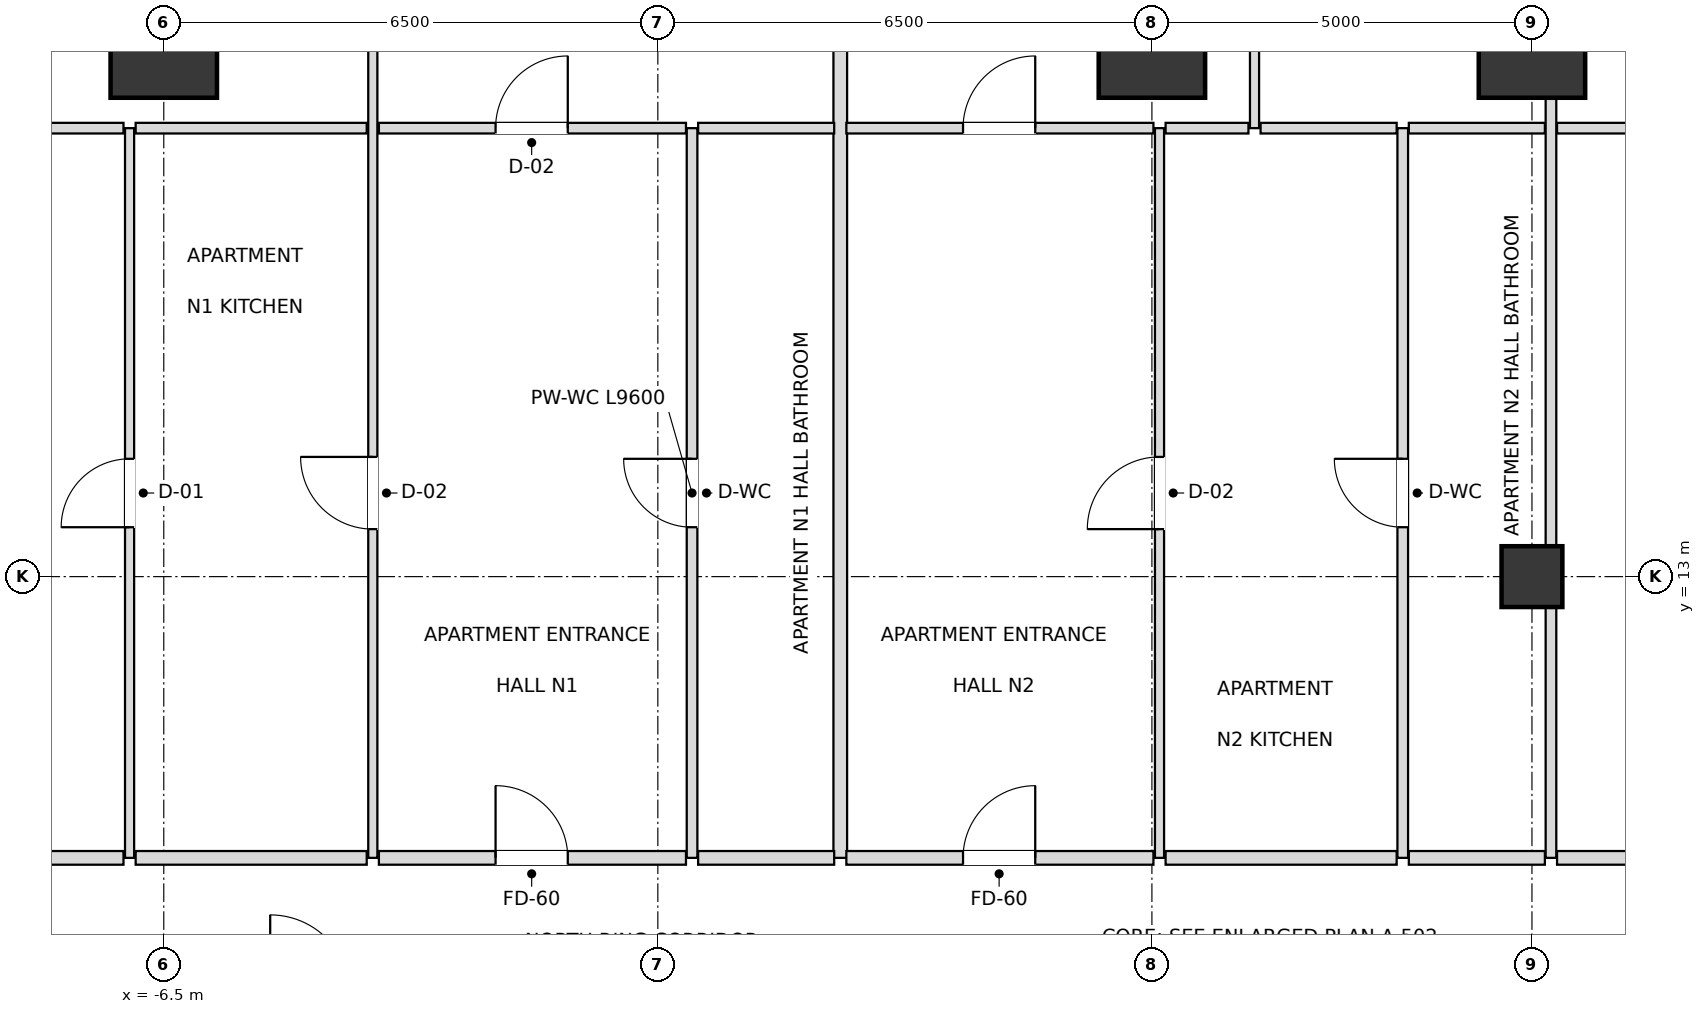
"""IFC4 building model, lengths in metres.
Left out: names, types, materials, properties, quantities, classifications, styles, units other than length and angle.
Written with IfcOpenShell. Run it as: python <this file> out.ifc"""

import sys

from ifc_helpers import new_model, si_unit, direction, frame, frame_2d, origin, origin_2d, place, context, subcontext, project, spatial, rectangle, extrude, element, fill, save


model = new_model("IFC4")
c1 = context("Model", 3, precision=1e-05, world=origin(), true_north=direction((0.0, 1.0)))
c2 = subcontext(c1, "Body", "Model", "MODEL_VIEW")
j1 = project(units=[si_unit("LENGTHUNIT", "METRE"), si_unit("PLANEANGLEUNIT", "RADIAN")], contexts=[c1])
p1 = place(None, origin())
s1 = spatial("IfcSite", under=j1, at=p1, CompositionType="ELEMENT")
p2 = place(p1, origin())
s2 = spatial("IfcBuilding", under=s1, at=p2, CompositionType="ELEMENT")
p3 = place(p2, frame((0.0, 0.0, 64.8)))
s3 = spatial("IfcBuildingStorey", under=s2, at=p3, CompositionType="ELEMENT", Elevation=64.8)
for number, where, z_axis, x_axis in (
    (1, (11.5, 20.0, 0.0), (0.0, 0.0, 1.0), (1.0, 0.0, 0.0)),
    (2, (6.5, 20.0, 0.0), (0.0, 0.0, 1.0), (1.0, 0.0, 0.0)),
    (3, (-6.5, 20.0, 0.0), (0.0, 0.0, 1.0), (1.0, 0.0, 0.0)),
):
    element("IfcColumn", number, at=place(p3, frame(where, z_axis=z_axis, x_axis=x_axis)), inside=s3, PredefinedType="USERDEFINED", context=c2, shape_type="SweptSolid", body=[
        extrude(rectangle(XDim=1.4, YDim=1.4, at=origin_2d()), origin(), (0.0, 0.0, 1.0), 3.6),
    ])
p4 = place(p3, frame((11.5, 13.0, 0.0), z_axis=(0.0, 0.0, 1.0), x_axis=(1.0, 0.0, 0.0)))
e4 = element("IfcColumn", 4, at=p4, inside=s3, PredefinedType="COLUMN", context=c2, shape_type="SweptSolid", body=[
    extrude(rectangle(XDim=0.8, YDim=0.8, at=origin_2d()), origin(), (0.0, 0.0, 1.0), 3.6),
])
p5 = place(p3, frame((-6.95, 9.3, 0.0), z_axis=(0.0, 0.0, 1.0), x_axis=(0.0, 1.0, 0.0)))
e5 = element("IfcWall", 5, at=p5, inside=s3, PredefinedType="PARTITIONING", context=c2, shape_type="SweptSolid", body=[
    extrude(rectangle(XDim=9.6, YDim=0.12, at=frame_2d((4.8, 0.0))), origin(), (0.0, 0.0, 1.0), 2.816),
])
p6 = place(p5, frame((4.35, 0.0, 0.0)))
e6 = element("IfcOpeningElement", 6, at=p6, cuts=e5, PredefinedType="OPENING", context=c2, shape_type="SweptSolid", body=[
    extrude(rectangle(XDim=0.9, YDim=2.1, at=frame_2d((0.45, 1.05))), frame((0.0, 0.07, 0.0), z_axis=(0.0, -1.0, 0.0), x_axis=(1.0, 0.0, 0.0)), (0.0, 0.0, 1.0), 0.14),
])
p7 = place(p3, frame((-3.75, 9.3, 0.0), z_axis=(0.0, 0.0, 1.0), x_axis=(0.0, 1.0, 0.0)))
e7 = element("IfcWall", 7, at=p7, inside=s3, PredefinedType="PARTITIONING", context=c2, shape_type="SweptSolid", body=[
    extrude(rectangle(XDim=15.6, YDim=0.12, at=frame_2d((7.8, 0.0))), origin(), (0.0, 0.0, 1.0), 2.816),
])
p8 = place(p7, frame((4.325, 0.0, 0.0)))
e8 = element("IfcOpeningElement", 8, at=p8, cuts=e7, PredefinedType="OPENING", context=c2, shape_type="SweptSolid", body=[
    extrude(rectangle(XDim=0.95, YDim=2.1, at=frame_2d((0.475, 1.05))), frame((0.0, 0.07, 0.0), z_axis=(0.0, -1.0, 0.0), x_axis=(1.0, 0.0, 0.0)), (0.0, 0.0, 1.0), 0.14),
])
p9 = place(p7, frame((12.15, 0.0, 0.0)))
e9 = element("IfcOpeningElement", 9, at=p9, cuts=e7, PredefinedType="OPENING", context=c2, shape_type="SweptSolid", body=[
    extrude(rectangle(XDim=0.9, YDim=2.1, at=frame_2d((0.45, 1.05))), frame((0.0, 0.07, 0.0), z_axis=(0.0, -1.0, 0.0), x_axis=(1.0, 0.0, 0.0)), (0.0, 0.0, 1.0), 0.14),
])
p10 = place(p3, frame((0.45, 9.3, 0.0), z_axis=(0.0, 0.0, 1.0), x_axis=(0.0, 1.0, 0.0)))
e10 = element("IfcWall", 10, at=p10, inside=s3, PredefinedType="PARTITIONING", context=c2, shape_type="SweptSolid", body=[
    extrude(rectangle(XDim=9.6, YDim=0.14, at=frame_2d((4.8, 0.0))), origin(), (0.0, 0.0, 1.0), 2.948),
])
p11 = place(p10, frame((4.35, 0.0, 0.0)))
e11 = element("IfcOpeningElement", 11, at=p11, cuts=e10, PredefinedType="OPENING", context=c2, shape_type="SweptSolid", body=[
    extrude(rectangle(XDim=0.9, YDim=2.1, at=frame_2d((0.45, 1.05))), frame((0.0, 0.08, 0.0), z_axis=(0.0, -1.0, 0.0), x_axis=(1.0, 0.0, 0.0)), (0.0, 0.0, 1.0), 0.16),
])
p12 = place(p3, frame((2.4, 9.3, 0.0), z_axis=(0.0, 0.0, 1.0), x_axis=(0.0, 1.0, 0.0)))
e12 = element("IfcWall", 12, at=p12, inside=s3, PredefinedType="PARTITIONING", context=c2, shape_type="SweptSolid", body=[
    extrude(rectangle(XDim=15.6, YDim=0.18, at=frame_2d((7.8, 0.0))), origin(), (0.0, 0.0, 1.0), 2.816),
])
p13 = place(p3, frame((6.6, 9.3, 0.0), z_axis=(0.0, 0.0, 1.0), x_axis=(0.0, 1.0, 0.0)))
e13 = element("IfcWall", 13, at=p13, inside=s3, PredefinedType="PARTITIONING", context=c2, shape_type="SweptSolid", body=[
    extrude(rectangle(XDim=9.6, YDim=0.12, at=frame_2d((4.8, 0.0))), origin(), (0.0, 0.0, 1.0), 2.816),
])
p14 = place(p13, frame((4.325, 0.0, 0.0)))
e14 = element("IfcOpeningElement", 14, at=p14, cuts=e13, PredefinedType="OPENING", context=c2, shape_type="SweptSolid", body=[
    extrude(rectangle(XDim=0.95, YDim=2.1, at=frame_2d((0.475, 1.05))), frame((0.0, 0.07, 0.0), z_axis=(0.0, -1.0, 0.0), x_axis=(1.0, 0.0, 0.0)), (0.0, 0.0, 1.0), 0.14),
])
p15 = place(p3, frame((7.85, 18.9, 0.0), z_axis=(0.0, 0.0, 1.0), x_axis=(0.0, 1.0, 0.0)))
e15 = element("IfcWall", 15, at=p15, inside=s3, PredefinedType="PARTITIONING", context=c2, shape_type="SweptSolid", body=[
    extrude(rectangle(XDim=6.0, YDim=0.12, at=frame_2d((3.0, 0.0))), origin(), (0.0, 0.0, 1.0), 2.816),
])
p16 = place(p15, frame((2.55, 0.0, 0.0)))
e16 = element("IfcOpeningElement", 16, at=p16, cuts=e15, PredefinedType="OPENING", context=c2, shape_type="SweptSolid", body=[
    extrude(rectangle(XDim=0.9, YDim=2.1, at=frame_2d((0.45, 1.05))), frame((0.0, 0.07, 0.0), z_axis=(0.0, -1.0, 0.0), x_axis=(1.0, 0.0, 0.0)), (0.0, 0.0, 1.0), 0.14),
])
p17 = place(p3, frame((9.8, 9.3, 0.0), z_axis=(0.0, 0.0, 1.0), x_axis=(0.0, 1.0, 0.0)))
e17 = element("IfcWall", 17, at=p17, inside=s3, PredefinedType="PARTITIONING", context=c2, shape_type="SweptSolid", body=[
    extrude(rectangle(XDim=9.6, YDim=0.14, at=frame_2d((4.8, 0.0))), origin(), (0.0, 0.0, 1.0), 2.816),
])
p18 = place(p17, frame((4.35, 0.0, 0.0)))
e18 = element("IfcOpeningElement", 18, at=p18, cuts=e17, PredefinedType="OPENING", context=c2, shape_type="SweptSolid", body=[
    extrude(rectangle(XDim=0.9, YDim=2.1, at=frame_2d((0.45, 1.05))), frame((0.0, 0.08, 0.0), z_axis=(0.0, -1.0, 0.0), x_axis=(1.0, 0.0, 0.0)), (0.0, 0.0, 1.0), 0.16),
])
p19 = place(p3, frame((11.75, 9.3, 0.0), z_axis=(0.0, 0.0, 1.0), x_axis=(0.0, 1.0, 0.0)))
e19 = element("IfcWall", 19, at=p19, inside=s3, PredefinedType="PARTITIONING", context=c2, shape_type="SweptSolid", body=[
    extrude(rectangle(XDim=15.6, YDim=0.14, at=frame_2d((7.8, 0.0))), origin(), (0.0, 0.0, 1.0), 2.736),
])
p20 = place(p19, frame((12.15, 0.0, 0.0)))
e20 = element("IfcOpeningElement", 20, at=p20, cuts=e19, PredefinedType="OPENING", context=c2, shape_type="SweptSolid", body=[
    extrude(rectangle(XDim=0.9, YDim=2.1, at=frame_2d((0.45, 1.05))), frame((0.0, 0.08, 0.0), z_axis=(0.0, -1.0, 0.0), x_axis=(1.0, 0.0, 0.0)), (0.0, 0.0, 1.0), 0.16),
])
p21 = place(p3, frame((-18.32, 9.3, 0.0), z_axis=(0.0, 0.0, 1.0), x_axis=(1.0, 0.0, 0.0)))
e21 = element("IfcWall", 21, at=p21, inside=s3, PredefinedType="PARTITIONING", context=c2, shape_type="SweptSolid", body=[
    extrude(rectangle(XDim=11.29, YDim=0.18, at=frame_2d((5.645, 0.0))), origin(), (0.0, 0.0, 1.0), 2.816),
])
p22 = place(p3, frame((-6.87, 9.3, 0.0), z_axis=(0.0, 0.0, 1.0), x_axis=(1.0, 0.0, 0.0)))
e22 = element("IfcWall", 22, at=p22, inside=s3, PredefinedType="PARTITIONING", context=c2, shape_type="SweptSolid", body=[
    extrude(rectangle(XDim=3.04, YDim=0.18, at=frame_2d((1.52, 0.0))), origin(), (0.0, 0.0, 1.0), 2.816),
])
p23 = place(p3, frame((-3.67, 9.3, 0.0), z_axis=(0.0, 0.0, 1.0), x_axis=(1.0, 0.0, 0.0)))
e23 = element("IfcWall", 23, at=p23, inside=s3, PredefinedType="PARTITIONING", context=c2, shape_type="SweptSolid", body=[
    extrude(rectangle(XDim=4.04, YDim=0.18, at=frame_2d((2.02, 0.0))), origin(), (0.0, 0.0, 1.0), 3.38),
])
p24 = place(p23, frame((1.535, 0.0, 0.0)))
e24 = element("IfcOpeningElement", 24, at=p24, cuts=e23, PredefinedType="OPENING", context=c2, shape_type="SweptSolid", body=[
    extrude(rectangle(XDim=0.95, YDim=2.15, at=frame_2d((0.475, 1.075))), frame((0.0, 0.1, 0.0), z_axis=(0.0, -1.0, 0.0), x_axis=(1.0, 0.0, 0.0)), (0.0, 0.0, 1.0), 0.2),
])
p25 = place(p3, frame((0.53, 9.3, 0.0), z_axis=(0.0, 0.0, 1.0), x_axis=(1.0, 0.0, 0.0)))
e25 = element("IfcWall", 25, at=p25, inside=s3, PredefinedType="PARTITIONING", context=c2, shape_type="SweptSolid", body=[
    extrude(rectangle(XDim=1.79, YDim=0.18, at=frame_2d((0.895, 0.0))), origin(), (0.0, 0.0, 1.0), 3.38),
])
p26 = place(p3, frame((2.48, 9.3, 0.0), z_axis=(0.0, 0.0, 1.0), x_axis=(1.0, 0.0, 0.0)))
e26 = element("IfcWall", 26, at=p26, inside=s3, PredefinedType="PARTITIONING", context=c2, shape_type="SweptSolid", body=[
    extrude(rectangle(XDim=4.04, YDim=0.18, at=frame_2d((2.02, 0.0))), origin(), (0.0, 0.0, 1.0), 3.38),
])
p27 = place(p26, frame((1.535, 0.0, 0.0)))
e27 = element("IfcOpeningElement", 27, at=p27, cuts=e26, PredefinedType="OPENING", context=c2, shape_type="SweptSolid", body=[
    extrude(rectangle(XDim=0.95, YDim=2.15, at=frame_2d((0.475, 1.075))), frame((0.0, 0.1, 0.0), z_axis=(0.0, -1.0, 0.0), x_axis=(1.0, 0.0, 0.0)), (0.0, 0.0, 1.0), 0.2),
])
p28 = place(p3, frame((6.68, 9.3, 0.0), z_axis=(0.0, 0.0, 1.0), x_axis=(1.0, 0.0, 0.0)))
e28 = element("IfcWall", 28, at=p28, inside=s3, PredefinedType="PARTITIONING", context=c2, shape_type="SweptSolid", body=[
    extrude(rectangle(XDim=3.04, YDim=0.18, at=frame_2d((1.52, 0.0))), origin(), (0.0, 0.0, 1.0), 3.38),
])
p29 = place(p3, frame((9.88, 9.3, 0.0), z_axis=(0.0, 0.0, 1.0), x_axis=(1.0, 0.0, 0.0)))
e29 = element("IfcWall", 29, at=p29, inside=s3, PredefinedType="PARTITIONING", context=c2, shape_type="SweptSolid", body=[
    extrude(rectangle(XDim=1.79, YDim=0.18, at=frame_2d((0.895, 0.0))), origin(), (0.0, 0.0, 1.0), 3.38),
])
p30 = place(p3, frame((11.83, 9.3, 0.0), z_axis=(0.0, 0.0, 1.0), x_axis=(1.0, 0.0, 0.0)))
e30 = element("IfcWall", 30, at=p30, inside=s3, PredefinedType="PARTITIONING", context=c2, shape_type="SweptSolid", body=[
    extrude(rectangle(XDim=6.49, YDim=0.18, at=frame_2d((3.245, 0.0))), origin(), (0.0, 0.0, 1.0), 2.816),
])
p31 = place(p3, frame((-8.57, 18.9, 0.0), z_axis=(0.0, 0.0, 1.0), x_axis=(1.0, 0.0, 0.0)))
e31 = element("IfcWall", 31, at=p31, inside=s3, PredefinedType="PARTITIONING", context=c2, shape_type="SweptSolid", body=[
    extrude(rectangle(XDim=1.54, YDim=0.14, at=frame_2d((0.77, 0.0))), origin(), (0.0, 0.0, 1.0), 3.38),
])
p32 = place(p3, frame((-6.87, 18.9, 0.0), z_axis=(0.0, 0.0, 1.0), x_axis=(1.0, 0.0, 0.0)))
e32 = element("IfcWall", 32, at=p32, inside=s3, PredefinedType="PARTITIONING", context=c2, shape_type="SweptSolid", body=[
    extrude(rectangle(XDim=3.04, YDim=0.14, at=frame_2d((1.52, 0.0))), origin(), (0.0, 0.0, 1.0), 2.816),
])
p33 = place(p3, frame((-3.67, 18.9, 0.0), z_axis=(0.0, 0.0, 1.0), x_axis=(1.0, 0.0, 0.0)))
e33 = element("IfcWall", 33, at=p33, inside=s3, PredefinedType="PARTITIONING", context=c2, shape_type="SweptSolid", body=[
    extrude(rectangle(XDim=4.04, YDim=0.14, at=frame_2d((2.02, 0.0))), origin(), (0.0, 0.0, 1.0), 3.38),
])
p34 = place(p33, frame((1.535, 0.0, 0.0)))
e34 = element("IfcOpeningElement", 34, at=p34, cuts=e33, PredefinedType="OPENING", context=c2, shape_type="SweptSolid", body=[
    extrude(rectangle(XDim=0.95, YDim=2.1, at=frame_2d((0.475, 1.05))), frame((0.0, 0.08, 0.0), z_axis=(0.0, -1.0, 0.0), x_axis=(1.0, 0.0, 0.0)), (0.0, 0.0, 1.0), 0.16),
])
p35 = place(p3, frame((0.53, 18.9, 0.0), z_axis=(0.0, 0.0, 1.0), x_axis=(1.0, 0.0, 0.0)))
e35 = element("IfcWall", 35, at=p35, inside=s3, PredefinedType="PARTITIONING", context=c2, shape_type="SweptSolid", body=[
    extrude(rectangle(XDim=1.79, YDim=0.14, at=frame_2d((0.895, 0.0))), origin(), (0.0, 0.0, 1.0), 3.38),
])
p36 = place(p3, frame((2.48, 18.9, 0.0), z_axis=(0.0, 0.0, 1.0), x_axis=(1.0, 0.0, 0.0)))
e36 = element("IfcWall", 36, at=p36, inside=s3, PredefinedType="PARTITIONING", context=c2, shape_type="SweptSolid", body=[
    extrude(rectangle(XDim=4.04, YDim=0.14, at=frame_2d((2.02, 0.0))), origin(), (0.0, 0.0, 1.0), 3.38),
])
p37 = place(p36, frame((1.535, 0.0, 0.0)))
e37 = element("IfcOpeningElement", 37, at=p37, cuts=e36, PredefinedType="OPENING", context=c2, shape_type="SweptSolid", body=[
    extrude(rectangle(XDim=0.95, YDim=2.1, at=frame_2d((0.475, 1.05))), frame((0.0, 0.08, 0.0), z_axis=(0.0, -1.0, 0.0), x_axis=(1.0, 0.0, 0.0)), (0.0, 0.0, 1.0), 0.16),
])
p38 = place(p3, frame((6.68, 18.9, 0.0), z_axis=(0.0, 0.0, 1.0), x_axis=(1.0, 0.0, 0.0)))
e38 = element("IfcWall", 38, at=p38, inside=s3, PredefinedType="PARTITIONING", context=c2, shape_type="SweptSolid", body=[
    extrude(rectangle(XDim=1.09, YDim=0.14, at=frame_2d((0.545, 0.0))), origin(), (0.0, 0.0, 1.0), 3.38),
])
p39 = place(p3, frame((7.93, 18.9, 0.0), z_axis=(0.0, 0.0, 1.0), x_axis=(1.0, 0.0, 0.0)))
e39 = element("IfcWall", 39, at=p39, inside=s3, PredefinedType="PARTITIONING", context=c2, shape_type="SweptSolid", body=[
    extrude(rectangle(XDim=1.79, YDim=0.14, at=frame_2d((0.895, 0.0))), origin(), (0.0, 0.0, 1.0), 3.38),
])
p40 = place(p3, frame((9.88, 18.9, 0.0), z_axis=(0.0, 0.0, 1.0), x_axis=(1.0, 0.0, 0.0)))
e40 = element("IfcWall", 40, at=p40, inside=s3, PredefinedType="PARTITIONING", context=c2, shape_type="SweptSolid", body=[
    extrude(rectangle(XDim=1.79, YDim=0.14, at=frame_2d((0.895, 0.0))), origin(), (0.0, 0.0, 1.0), 2.736),
])
p41 = place(p3, frame((11.83, 18.9, 0.0), z_axis=(0.0, 0.0, 1.0), x_axis=(1.0, 0.0, 0.0)))
e41 = element("IfcWall", 41, at=p41, inside=s3, PredefinedType="PARTITIONING", context=c2, shape_type="SweptSolid", body=[
    extrude(rectangle(XDim=3.34, YDim=0.14, at=frame_2d((1.67, 0.0))), origin(), (0.0, 0.0, 1.0), 2.736),
])
p42 = place(p41, frame((1.195, 0.0, 0.0)))
e42 = element("IfcOpeningElement", 42, at=p42, cuts=e41, PredefinedType="OPENING", context=c2, shape_type="SweptSolid", body=[
    extrude(rectangle(XDim=0.95, YDim=2.1, at=frame_2d((0.475, 1.05))), frame((0.0, 0.08, 0.0), z_axis=(0.0, -1.0, 0.0), x_axis=(1.0, 0.0, 0.0)), (0.0, 0.0, 1.0), 0.16),
])
p43 = place(p11, origin())
e43 = element("IfcDoor", 43, at=p43, inside=s3, OperationType="SINGLE_SWING_RIGHT", PredefinedType="DOOR", context=c2, shape_type="SweptSolid", body=[
    extrude(rectangle(XDim=0.9, YDim=2.1, at=frame_2d((0.45, 1.05))), frame((0.0, 0.025, 0.0), z_axis=(0.0, -1.0, 0.0), x_axis=(1.0, 0.0, 0.0)), (0.0, 0.0, 1.0), 0.05),
])
fill(e11, e43)
p44 = place(p24, origin())
e44 = element("IfcDoor", 44, at=p44, inside=s3, OperationType="SINGLE_SWING_LEFT", PredefinedType="DOOR", context=c2, shape_type="SweptSolid", body=[
    extrude(rectangle(XDim=0.95, YDim=2.15, at=frame_2d((0.475, 1.075))), frame((0.0, 0.025, 0.0), z_axis=(0.0, -1.0, 0.0), x_axis=(1.0, 0.0, 0.0)), (0.0, 0.0, 1.0), 0.05),
])
fill(e24, e44)
p45 = place(p8, origin())
e45 = element("IfcDoor", 45, at=p45, inside=s3, OperationType="SINGLE_SWING_RIGHT", PredefinedType="DOOR", context=c2, shape_type="SweptSolid", body=[
    extrude(rectangle(XDim=0.95, YDim=2.1, at=frame_2d((0.475, 1.05))), frame((0.0, 0.025, 0.0), z_axis=(0.0, -1.0, 0.0), x_axis=(1.0, 0.0, 0.0)), (0.0, 0.0, 1.0), 0.05),
])
fill(e8, e45)
p46 = place(p6, origin())
e46 = element("IfcDoor", 46, at=p46, inside=s3, OperationType="SINGLE_SWING_LEFT", PredefinedType="DOOR", context=c2, shape_type="SweptSolid", body=[
    extrude(rectangle(XDim=0.9, YDim=2.1, at=frame_2d((0.45, 1.05))), frame((0.0, 0.025, 0.0), z_axis=(0.0, -1.0, 0.0), x_axis=(1.0, 0.0, 0.0)), (0.0, 0.0, 1.0), 0.05),
])
fill(e6, e46)
p47 = place(p34, origin())
e47 = element("IfcDoor", 47, at=p47, inside=s3, OperationType="SINGLE_SWING_RIGHT", PredefinedType="DOOR", context=c2, shape_type="SweptSolid", body=[
    extrude(rectangle(XDim=0.95, YDim=2.1, at=frame_2d((0.475, 1.05))), frame((0.0, 0.025, 0.0), z_axis=(0.0, -1.0, 0.0), x_axis=(1.0, 0.0, 0.0)), (0.0, 0.0, 1.0), 0.05),
])
fill(e34, e47)
p48 = place(p27, origin())
e48 = element("IfcDoor", 48, at=p48, inside=s3, OperationType="SINGLE_SWING_RIGHT", PredefinedType="DOOR", context=c2, shape_type="SweptSolid", body=[
    extrude(rectangle(XDim=0.95, YDim=2.15, at=frame_2d((0.475, 1.075))), frame((0.0, 0.025, 0.0), z_axis=(0.0, -1.0, 0.0), x_axis=(1.0, 0.0, 0.0)), (0.0, 0.0, 1.0), 0.05),
])
fill(e27, e48)
p49 = place(p14, origin())
e49 = element("IfcDoor", 49, at=p49, inside=s3, OperationType="SINGLE_SWING_LEFT", PredefinedType="DOOR", context=c2, shape_type="SweptSolid", body=[
    extrude(rectangle(XDim=0.95, YDim=2.1, at=frame_2d((0.475, 1.05))), frame((0.0, 0.025, 0.0), z_axis=(0.0, -1.0, 0.0), x_axis=(1.0, 0.0, 0.0)), (0.0, 0.0, 1.0), 0.05),
])
fill(e14, e49)
p50 = place(p18, origin())
e50 = element("IfcDoor", 50, at=p50, inside=s3, OperationType="SINGLE_SWING_RIGHT", PredefinedType="DOOR", context=c2, shape_type="SweptSolid", body=[
    extrude(rectangle(XDim=0.9, YDim=2.1, at=frame_2d((0.45, 1.05))), frame((0.0, 0.025, 0.0), z_axis=(0.0, -1.0, 0.0), x_axis=(1.0, 0.0, 0.0)), (0.0, 0.0, 1.0), 0.05),
])
fill(e18, e50)
p51 = place(p37, origin())
e51 = element("IfcDoor", 51, at=p51, inside=s3, OperationType="SINGLE_SWING_RIGHT", PredefinedType="DOOR", context=c2, shape_type="SweptSolid", body=[
    extrude(rectangle(XDim=0.95, YDim=2.1, at=frame_2d((0.475, 1.05))), frame((0.0, 0.025, 0.0), z_axis=(0.0, -1.0, 0.0), x_axis=(1.0, 0.0, 0.0)), (0.0, 0.0, 1.0), 0.05),
])
fill(e37, e51)
save(model, sys.argv[1])
